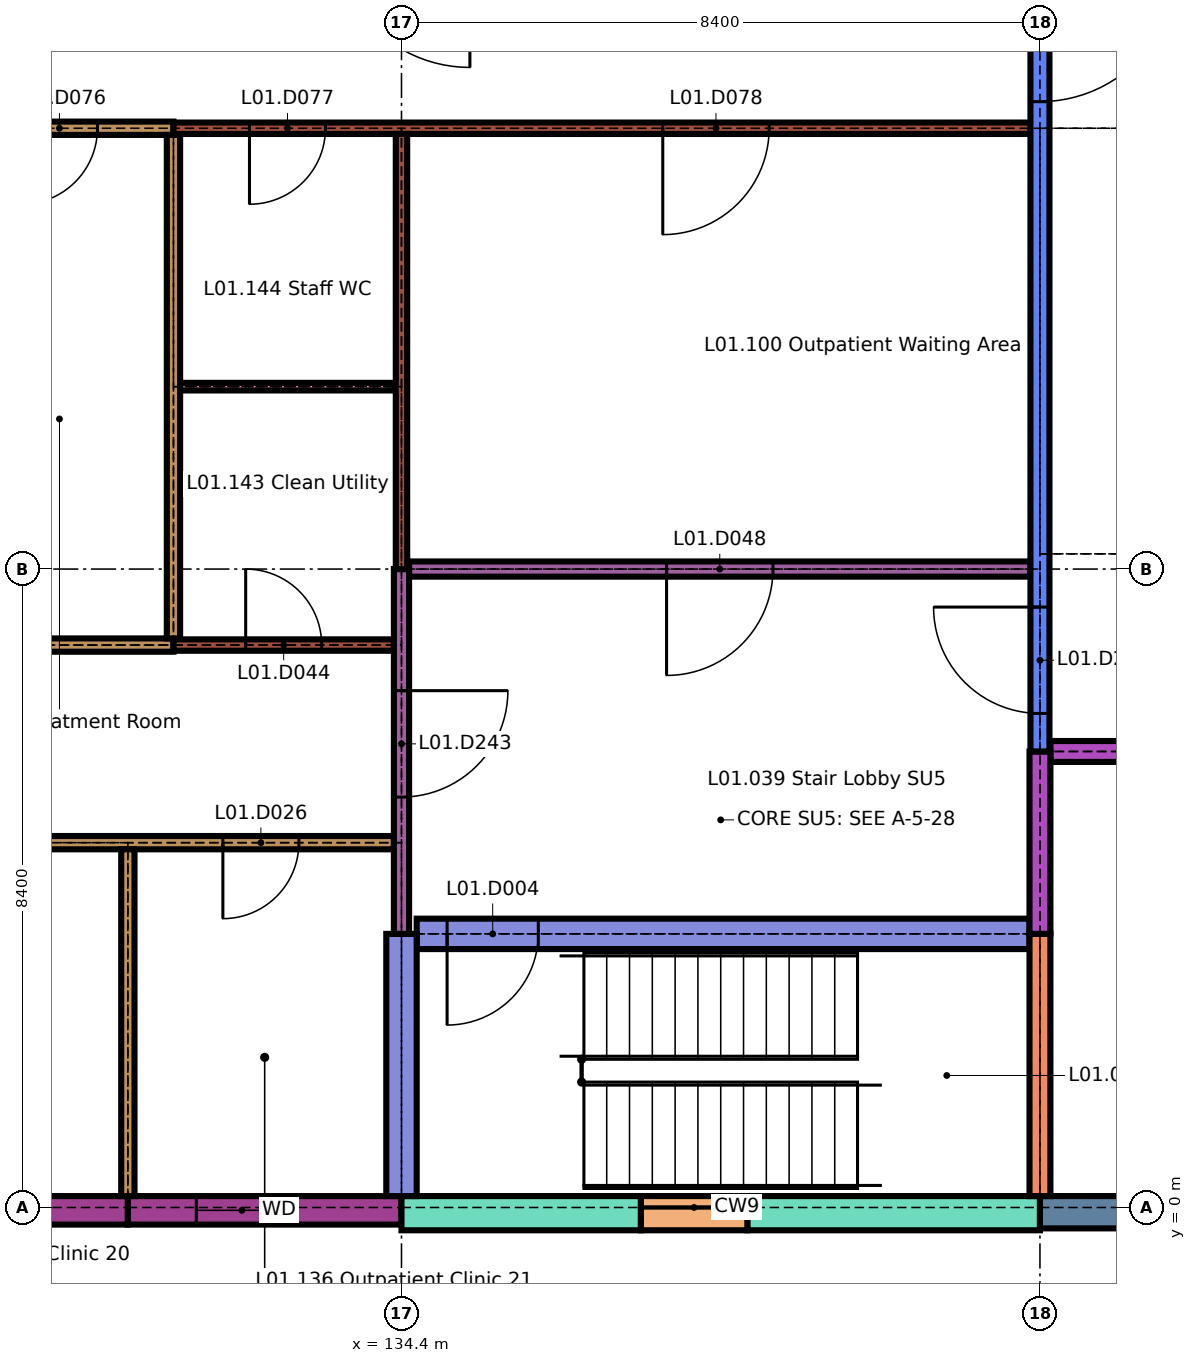
"""IFC4 building model, lengths in metres.
Left out: names, types, materials, properties, quantities, classifications, styles, units other than length and angle.
Written with IfcOpenShell. Run it as: python <this file> out.ifc"""

import sys

from ifc_helpers import new_model, si_unit, direction, frame, frame_2d, origin, place, context, subcontext, project, spatial, rectangle, extrude, element, fill, save


model = new_model("IFC4")
c1 = context("Model", 3, precision=1e-05, world=origin(), true_north=direction((0.0, 1.0)))
c2 = subcontext(c1, "Body", "Model", "MODEL_VIEW")
j1 = project(units=[si_unit("LENGTHUNIT", "METRE"), si_unit("PLANEANGLEUNIT", "RADIAN")], contexts=[c1])
p1 = place(None, origin())
s1 = spatial("IfcSite", under=j1, at=p1, CompositionType="ELEMENT")
p2 = place(p1, origin())
s2 = spatial("IfcBuilding", under=s1, at=p2, CompositionType="ELEMENT")
p3 = place(p2, frame((0.0, 0.0, 4.5)))
s3 = spatial("IfcBuildingStorey", under=s2, at=p3, CompositionType="ELEMENT", Elevation=4.5)
p4 = place(p3, frame((126.45, -0.038, 0.0), z_axis=(0.0, 0.0, 1.0), x_axis=(1.0, 0.0, 0.0)))
e1 = element("IfcWall", 1, at=p4, inside=s3, PredefinedType="SOLIDWALL", context=c2, shape_type="SweptSolid", body=[
    extrude(rectangle(XDim=4.35, YDim=0.375, at=frame_2d((2.175, 0.0))), origin(), (0.0, 0.0, 1.0), 3.15),
])
p5 = place(p4, frame((1.2, 0.0, 0.9)))
e2 = element("IfcOpeningElement", 2, at=p5, cuts=e1, PredefinedType="OPENING", context=c2, shape_type="SweptSolid", body=[
    extrude(rectangle(XDim=0.9, YDim=1.5, at=frame_2d((0.45, 0.75))), frame((0.0, 0.198, 0.0), z_axis=(0.0, -1.0, 0.0), x_axis=(1.0, 0.0, 0.0)), (0.0, 0.0, 1.0), 0.395),
])
p6 = place(p3, frame((130.8, -0.038, 0.0), z_axis=(0.0, 0.0, 1.0), x_axis=(1.0, 0.0, 0.0)))
e3 = element("IfcWall", 3, at=p6, inside=s3, PredefinedType="SOLIDWALL", context=c2, shape_type="SweptSolid", body=[
    extrude(rectangle(XDim=3.6, YDim=0.375, at=frame_2d((1.8, 0.0))), origin(), (0.0, 0.0, 1.0), 3.15),
])
p7 = place(p6, frame((0.9, 0.0, 0.9)))
e4 = element("IfcOpeningElement", 4, at=p7, cuts=e3, PredefinedType="OPENING", context=c2, shape_type="SweptSolid", body=[
    extrude(rectangle(XDim=1.2, YDim=1.5, at=frame_2d((0.6, 0.75))), frame((0.0, 0.198, 0.0), z_axis=(0.0, -1.0, 0.0), x_axis=(1.0, 0.0, 0.0)), (0.0, 0.0, 1.0), 0.395),
])
p8 = place(p3, frame((134.4, -0.075, 0.0), z_axis=(0.0, 0.0, 1.0), x_axis=(1.0, 0.0, 0.0)))
e5 = element("IfcWall", 5, at=p8, inside=s3, PredefinedType="SOLIDWALL", context=c2, shape_type="SweptSolid", body=[
    extrude(rectangle(XDim=3.15, YDim=0.45, at=frame_2d((1.575, 0.0))), origin(), (0.0, 0.0, 1.0), 3.45),
])
p9 = place(p3, frame((138.95, -0.075, 0.0), z_axis=(0.0, 0.0, 1.0), x_axis=(1.0, 0.0, 0.0)))
e6 = element("IfcWall", 6, at=p9, inside=s3, PredefinedType="SOLIDWALL", context=c2, shape_type="SweptSolid", body=[
    extrude(rectangle(XDim=3.85, YDim=0.45, at=frame_2d((1.925, 0.0))), origin(), (0.0, 0.0, 1.0), 3.45),
])
p10 = place(p3, frame((137.55, -0.075, 0.0), z_axis=(0.0, 0.0, 1.0), x_axis=(1.0, 0.0, 0.0)))
e7 = element("IfcWall", 7, at=p10, inside=s3, PredefinedType="SOLIDWALL", context=c2, shape_type="SweptSolid", body=[
    extrude(rectangle(XDim=1.4, YDim=0.45, at=frame_2d((0.7, 0.0))), origin(), (0.0, 0.0, 1.0), 0.6),
])
p11 = place(p3, frame((142.8, -0.062, 0.0), z_axis=(0.0, 0.0, 1.0), x_axis=(1.0, 0.0, 0.0)))
e8 = element("IfcWall", 8, at=p11, inside=s3, PredefinedType="SOLIDWALL", context=c2, shape_type="SweptSolid", body=[
    extrude(rectangle(XDim=7.975, YDim=0.425, at=frame_2d((3.987, 0.0))), origin(), (0.0, 0.0, 1.0), 3.15),
])
p12 = place(p3, frame((134.6, 3.6, 0.0), z_axis=(0.0, 0.0, 1.0), x_axis=(1.0, 0.0, 0.0)))
e9 = element("IfcWall", 9, at=p12, inside=s3, PredefinedType="SHEAR", context=c2, shape_type="SweptSolid", body=[
    extrude(rectangle(XDim=8.062, YDim=0.4, at=frame_2d((4.031, 0.0))), origin(), (0.0, 0.0, 1.0), 3.45),
])
p13 = place(p12, frame((0.4, 0.0, 0.0)))
e10 = element("IfcOpeningElement", 10, at=p13, cuts=e9, PredefinedType="OPENING", context=c2, shape_type="SweptSolid", body=[
    extrude(rectangle(XDim=1.2, YDim=2.1, at=frame_2d((0.6, 1.05))), frame((0.0, 0.21, 0.0), z_axis=(0.0, -1.0, 0.0), x_axis=(1.0, 0.0, 0.0)), (0.0, 0.0, 1.0), 0.42),
])
p14 = place(p3, frame((109.3, 4.8, 0.0), z_axis=(0.0, 0.0, 1.0), x_axis=(1.0, 0.0, 0.0)))
e11 = element("IfcWall", 11, at=p14, inside=s3, PredefinedType="PARTITIONING", context=c2, shape_type="SweptSolid", body=[
    extrude(rectangle(XDim=25.0, YDim=0.175, at=frame_2d((12.5, 0.0))), origin(), (0.0, 0.0, 1.0), 3.45),
])
p15 = place(p14, frame((1.25, 0.0, 0.0)))
e12 = element("IfcOpeningElement", 12, at=p15, cuts=e11, PredefinedType="OPENING", context=c2, shape_type="SweptSolid", body=[
    extrude(rectangle(XDim=1.0, YDim=2.1, at=frame_2d((0.5, 1.05))), frame((0.0, 0.097, 0.0), z_axis=(0.0, -1.0, 0.0), x_axis=(1.0, 0.0, 0.0)), (0.0, 0.0, 1.0), 0.195),
])
p16 = place(p14, frame((4.8, 0.0, 0.0)))
e13 = element("IfcOpeningElement", 13, at=p16, cuts=e11, PredefinedType="OPENING", context=c2, shape_type="SweptSolid", body=[
    extrude(rectangle(XDim=1.0, YDim=2.1, at=frame_2d((0.5, 1.05))), frame((0.0, 0.097, 0.0), z_axis=(0.0, -1.0, 0.0), x_axis=(1.0, 0.0, 0.0)), (0.0, 0.0, 1.0), 0.195),
])
p17 = place(p14, frame((8.4, 0.0, 0.0)))
e14 = element("IfcOpeningElement", 14, at=p17, cuts=e11, PredefinedType="OPENING", context=c2, shape_type="SweptSolid", body=[
    extrude(rectangle(XDim=1.0, YDim=2.1, at=frame_2d((0.5, 1.05))), frame((0.0, 0.097, 0.0), z_axis=(0.0, -1.0, 0.0), x_axis=(1.0, 0.0, 0.0)), (0.0, 0.0, 1.0), 0.195),
])
p18 = place(p14, frame((12.0, 0.0, 0.0)))
e15 = element("IfcOpeningElement", 15, at=p18, cuts=e11, PredefinedType="OPENING", context=c2, shape_type="SweptSolid", body=[
    extrude(rectangle(XDim=1.0, YDim=2.1, at=frame_2d((0.5, 1.05))), frame((0.0, 0.097, 0.0), z_axis=(0.0, -1.0, 0.0), x_axis=(1.0, 0.0, 0.0)), (0.0, 0.0, 1.0), 0.195),
])
p19 = place(p14, frame((15.6, 0.0, 0.0)))
e16 = element("IfcOpeningElement", 16, at=p19, cuts=e11, PredefinedType="OPENING", context=c2, shape_type="SweptSolid", body=[
    extrude(rectangle(XDim=1.0, YDim=2.1, at=frame_2d((0.5, 1.05))), frame((0.0, 0.097, 0.0), z_axis=(0.0, -1.0, 0.0), x_axis=(1.0, 0.0, 0.0)), (0.0, 0.0, 1.0), 0.195),
])
p20 = place(p14, frame((19.2, 0.0, 0.0)))
e17 = element("IfcOpeningElement", 17, at=p20, cuts=e11, PredefinedType="OPENING", context=c2, shape_type="SweptSolid", body=[
    extrude(rectangle(XDim=1.0, YDim=2.1, at=frame_2d((0.5, 1.05))), frame((0.0, 0.097, 0.0), z_axis=(0.0, -1.0, 0.0), x_axis=(1.0, 0.0, 0.0)), (0.0, 0.0, 1.0), 0.195),
])
p21 = place(p14, frame((22.75, 0.0, 0.0)))
e18 = element("IfcOpeningElement", 18, at=p21, cuts=e11, PredefinedType="OPENING", context=c2, shape_type="SweptSolid", body=[
    extrude(rectangle(XDim=1.0, YDim=2.1, at=frame_2d((0.5, 1.05))), frame((0.0, 0.097, 0.0), z_axis=(0.0, -1.0, 0.0), x_axis=(1.0, 0.0, 0.0)), (0.0, 0.0, 1.0), 0.195),
])
p22 = place(p3, frame((142.938, 6.0, 0.0), z_axis=(0.0, 0.0, 1.0), x_axis=(1.0, 0.0, 0.0)))
e19 = element("IfcWall", 19, at=p22, inside=s3, PredefinedType="SOLIDWALL", context=c2, shape_type="SweptSolid", body=[
    extrude(rectangle(XDim=7.363, YDim=0.275, at=frame_2d((3.681, 0.0))), origin(), (0.0, 0.0, 1.0), 3.45),
])
p23 = place(p22, frame((2.931, 0.0, 0.0)))
e20 = element("IfcOpeningElement", 20, at=p23, cuts=e19, PredefinedType="OPENING", context=c2, shape_type="SweptSolid", body=[
    extrude(rectangle(XDim=1.5, YDim=2.4, at=frame_2d((0.75, 1.2))), frame((0.0, 0.147, 0.0), z_axis=(0.0, -1.0, 0.0), x_axis=(1.0, 0.0, 0.0)), (0.0, 0.0, 1.0), 0.295),
])
p24 = place(p3, frame((128.4, 7.4, 0.0), z_axis=(0.0, 0.0, 1.0), x_axis=(1.0, 0.0, 0.0)))
e21 = element("IfcWall", 21, at=p24, inside=s3, PredefinedType="PARTITIONING", context=c2, shape_type="SweptSolid", body=[
    extrude(rectangle(XDim=3.0, YDim=0.175, at=frame_2d((1.5, 0.0))), origin(), (0.0, 0.0, 1.0), 3.45),
])
p25 = place(p3, frame((131.4, 7.4, 0.0), z_axis=(0.0, 0.0, 1.0), x_axis=(1.0, 0.0, 0.0)))
e22 = element("IfcWall", 22, at=p25, inside=s3, PredefinedType="PARTITIONING", context=c2, shape_type="SweptSolid", body=[
    extrude(rectangle(XDim=2.9, YDim=0.15, at=frame_2d((1.45, 0.0))), origin(), (0.0, 0.0, 1.0), 3.45),
])
p26 = place(p25, frame((0.95, 0.0, 0.0)))
e23 = element("IfcOpeningElement", 23, at=p26, cuts=e22, PredefinedType="OPENING", context=c2, shape_type="SweptSolid", body=[
    extrude(rectangle(XDim=1.0, YDim=2.1, at=frame_2d((0.5, 1.05))), frame((0.0, 0.085, 0.0), z_axis=(0.0, -1.0, 0.0), x_axis=(1.0, 0.0, 0.0)), (0.0, 0.0, 1.0), 0.17),
])
p27 = place(p3, frame((134.5, 8.4, 0.0), z_axis=(0.0, 0.0, 1.0), x_axis=(1.0, 0.0, 0.0)))
e24 = element("IfcWall", 24, at=p27, inside=s3, PredefinedType="PARTITIONING", context=c2, shape_type="SweptSolid", body=[
    extrude(rectangle(XDim=8.175, YDim=0.2, at=frame_2d((4.087, 0.0))), origin(), (0.0, 0.0, 1.0), 3.45),
])
p28 = place(p27, frame((3.387, 0.0, 0.0)))
e25 = element("IfcOpeningElement", 25, at=p28, cuts=e24, PredefinedType="OPENING", context=c2, shape_type="SweptSolid", body=[
    extrude(rectangle(XDim=1.4, YDim=2.1, at=frame_2d((0.7, 1.05))), frame((0.0, 0.11, 0.0), z_axis=(0.0, -1.0, 0.0), x_axis=(1.0, 0.0, 0.0)), (0.0, 0.0, 1.0), 0.22),
])
p29 = place(p3, frame((131.488, 10.8, 0.0), z_axis=(0.0, 0.0, 1.0), x_axis=(1.0, 0.0, 0.0)))
e26 = element("IfcWall", 26, at=p29, inside=s3, PredefinedType="PARTITIONING", context=c2, shape_type="SweptSolid", body=[
    extrude(rectangle(XDim=2.837, YDim=0.1, at=frame_2d((1.419, 0.0))), origin(), (0.0, 0.0, 1.0), 3.45),
])
p30 = place(p3, frame((128.4, 14.2, 0.0), z_axis=(0.0, 0.0, 1.0), x_axis=(1.0, 0.0, 0.0)))
e27 = element("IfcWall", 27, at=p30, inside=s3, PredefinedType="PARTITIONING", context=c2, shape_type="SweptSolid", body=[
    extrude(rectangle(XDim=3.0, YDim=0.175, at=frame_2d((1.5, 0.0))), origin(), (0.0, 0.0, 1.0), 3.45),
])
p31 = place(p30, frame((1.0, 0.0, 0.0)))
e28 = element("IfcOpeningElement", 28, at=p31, cuts=e27, PredefinedType="OPENING", context=c2, shape_type="SweptSolid", body=[
    extrude(rectangle(XDim=1.0, YDim=2.1, at=frame_2d((0.5, 1.05))), frame((0.0, 0.097, 0.0), z_axis=(0.0, -1.0, 0.0), x_axis=(1.0, 0.0, 0.0)), (0.0, 0.0, 1.0), 0.195),
])
p32 = place(p3, frame((131.4, 14.2, 0.0), z_axis=(0.0, 0.0, 1.0), x_axis=(1.0, 0.0, 0.0)))
e29 = element("IfcWall", 29, at=p32, inside=s3, PredefinedType="PARTITIONING", context=c2, shape_type="SweptSolid", body=[
    extrude(rectangle(XDim=11.275, YDim=0.15, at=frame_2d((5.638, 0.0))), origin(), (0.0, 0.0, 1.0), 3.45),
])
p33 = place(p32, frame((1.0, 0.0, 0.0)))
e30 = element("IfcOpeningElement", 30, at=p33, cuts=e29, PredefinedType="OPENING", context=c2, shape_type="SweptSolid", body=[
    extrude(rectangle(XDim=1.0, YDim=2.1, at=frame_2d((0.5, 1.05))), frame((0.0, 0.085, 0.0), z_axis=(0.0, -1.0, 0.0), x_axis=(1.0, 0.0, 0.0)), (0.0, 0.0, 1.0), 0.17),
])
p34 = place(p32, frame((6.438, 0.0, 0.0)))
e31 = element("IfcOpeningElement", 31, at=p34, cuts=e29, PredefinedType="OPENING", context=c2, shape_type="SweptSolid", body=[
    extrude(rectangle(XDim=1.4, YDim=2.1, at=frame_2d((0.7, 1.05))), frame((0.0, 0.085, 0.0), z_axis=(0.0, -1.0, 0.0), x_axis=(1.0, 0.0, 0.0)), (0.0, 0.0, 1.0), 0.17),
])
p35 = place(p3, frame((130.8, 0.15, 0.0), z_axis=(0.0, 0.0, 1.0), x_axis=(0.0, 1.0, 0.0)))
e32 = element("IfcWall", 32, at=p35, inside=s3, PredefinedType="PARTITIONING", context=c2, shape_type="SweptSolid", body=[
    extrude(rectangle(XDim=4.562, YDim=0.175, at=frame_2d((2.281, 0.0))), origin(), (0.0, 0.0, 1.0), 3.45),
])
p36 = place(p3, frame((131.4, 7.488, 0.0), z_axis=(0.0, 0.0, 1.0), x_axis=(0.0, 1.0, 0.0)))
e33 = element("IfcWall", 33, at=p36, inside=s3, PredefinedType="PARTITIONING", context=c2, shape_type="SweptSolid", body=[
    extrude(rectangle(XDim=6.625, YDim=0.175, at=frame_2d((3.312, 0.0))), origin(), (0.0, 0.0, 1.0), 3.45),
])
p37 = place(p3, frame((134.4, 0.15, 0.0), z_axis=(0.0, 0.0, 1.0), x_axis=(0.0, 1.0, 0.0)))
e34 = element("IfcWall", 34, at=p37, inside=s3, PredefinedType="SHEAR", context=c2, shape_type="SweptSolid", body=[
    extrude(rectangle(XDim=3.45, YDim=0.4, at=frame_2d((1.725, 0.0))), origin(), (0.0, 0.0, 1.0), 3.45),
])
p38 = place(p3, frame((134.4, 3.6, 0.0), z_axis=(0.0, 0.0, 1.0), x_axis=(0.0, 1.0, 0.0)))
e35 = element("IfcWall", 35, at=p38, inside=s3, PredefinedType="PARTITIONING", context=c2, shape_type="SweptSolid", body=[
    extrude(rectangle(XDim=4.8, YDim=0.2, at=frame_2d((2.4, 0.0))), origin(), (0.0, 0.0, 1.0), 3.45),
])
p39 = place(p38, frame((1.8, 0.0, 0.0)))
e36 = element("IfcOpeningElement", 36, at=p39, cuts=e35, PredefinedType="OPENING", context=c2, shape_type="SweptSolid", body=[
    extrude(rectangle(XDim=1.4, YDim=2.1, at=frame_2d((0.7, 1.05))), frame((0.0, 0.11, 0.0), z_axis=(0.0, -1.0, 0.0), x_axis=(1.0, 0.0, 0.0)), (0.0, 0.0, 1.0), 0.22),
])
p40 = place(p3, frame((134.4, 8.4, 0.0), z_axis=(0.0, 0.0, 1.0), x_axis=(0.0, 1.0, 0.0)))
e37 = element("IfcWall", 37, at=p40, inside=s3, PredefinedType="PARTITIONING", context=c2, shape_type="SweptSolid", body=[
    extrude(rectangle(XDim=5.725, YDim=0.15, at=frame_2d((2.863, 0.0))), origin(), (0.0, 0.0, 1.0), 3.45),
])
p41 = place(p3, frame((142.8, 0.15, 0.0), z_axis=(0.0, 0.0, 1.0), x_axis=(0.0, 1.0, 0.0)))
e38 = element("IfcWall", 38, at=p41, inside=s3, PredefinedType="SOLIDWALL", context=c2, shape_type="SweptSolid", body=[
    extrude(rectangle(XDim=3.45, YDim=0.275, at=frame_2d((1.725, 0.0))), origin(), (0.0, 0.0, 1.0), 3.45),
])
p42 = place(p3, frame((142.8, 3.6, 0.0), z_axis=(0.0, 0.0, 1.0), x_axis=(0.0, 1.0, 0.0)))
e39 = element("IfcWall", 39, at=p42, inside=s3, PredefinedType="SOLIDWALL", context=c2, shape_type="SweptSolid", body=[
    extrude(rectangle(XDim=2.4, YDim=0.275, at=frame_2d((1.2, 0.0))), origin(), (0.0, 0.0, 1.0), 3.45),
])
p43 = place(p3, frame((142.8, 6.0, 0.0), z_axis=(0.0, 0.0, 1.0), x_axis=(0.0, 1.0, 0.0)))
e40 = element("IfcWall", 40, at=p43, inside=s3, PredefinedType="SOLIDWALL", context=c2, shape_type="SweptSolid", body=[
    extrude(rectangle(XDim=10.7, YDim=0.25, at=frame_2d((5.35, 0.0))), origin(), (0.0, 0.0, 1.0), 3.45),
])
p44 = place(p43, frame((0.5, 0.0, 0.0)))
e41 = element("IfcOpeningElement", 41, at=p44, cuts=e40, PredefinedType="OPENING", context=c2, shape_type="SweptSolid", body=[
    extrude(rectangle(XDim=1.4, YDim=2.1, at=frame_2d((0.7, 1.05))), frame((0.0, 0.135, 0.0), z_axis=(0.0, -1.0, 0.0), x_axis=(1.0, 0.0, 0.0)), (0.0, 0.0, 1.0), 0.27),
])
p45 = place(p43, frame((8.55, 0.0, 0.0)))
e42 = element("IfcOpeningElement", 42, at=p45, cuts=e40, PredefinedType="OPENING", context=c2, shape_type="SweptSolid", body=[
    extrude(rectangle(XDim=1.8, YDim=2.4, at=frame_2d((0.9, 1.2))), frame((0.0, 0.135, 0.0), z_axis=(0.0, -1.0, 0.0), x_axis=(1.0, 0.0, 0.0)), (0.0, 0.0, 1.0), 0.27),
])
p46 = place(p7, origin())
e43 = element("IfcWindow", 43, at=p46, inside=s3, PartitioningType="SINGLE_PANEL", PredefinedType="WINDOW", context=c2, shape_type="SweptSolid", body=[
    extrude(rectangle(XDim=1.2, YDim=1.5, at=frame_2d((0.6, 0.75))), frame((0.0, 0.03, 0.0), z_axis=(0.0, -1.0, 0.0), x_axis=(1.0, 0.0, 0.0)), (0.0, 0.0, 1.0), 0.06),
])
fill(e4, e43)
p47 = place(p13, origin())
e44 = element("IfcDoor", 44, at=p47, inside=s3, OperationType="SINGLE_SWING_LEFT", PredefinedType="DOOR", context=c2, shape_type="SweptSolid", body=[
    extrude(rectangle(XDim=1.2, YDim=2.1, at=frame_2d((0.6, 1.05))), frame((0.0, 0.025, 0.0), z_axis=(0.0, -1.0, 0.0), x_axis=(1.0, 0.0, 0.0)), (0.0, 0.0, 1.0), 0.05),
])
fill(e10, e44)
p48 = place(p21, origin())
e45 = element("IfcDoor", 45, at=p48, inside=s3, OperationType="SINGLE_SWING_LEFT", PredefinedType="DOOR", context=c2, shape_type="SweptSolid", body=[
    extrude(rectangle(XDim=1.0, YDim=2.1, at=frame_2d((0.5, 1.05))), frame((0.0, 0.035, 0.0), z_axis=(0.0, -1.0, 0.0), x_axis=(1.0, 0.0, 0.0)), (0.0, 0.0, 1.0), 0.07),
])
fill(e18, e45)
p49 = place(p26, origin())
e46 = element("IfcDoor", 46, at=p49, inside=s3, OperationType="SINGLE_SWING_RIGHT", PredefinedType="DOOR", context=c2, shape_type="SweptSolid", body=[
    extrude(rectangle(XDim=1.0, YDim=2.1, at=frame_2d((0.5, 1.05))), frame((0.0, 0.025, 0.0), z_axis=(0.0, -1.0, 0.0), x_axis=(1.0, 0.0, 0.0)), (0.0, 0.0, 1.0), 0.05),
])
fill(e23, e46)
p50 = place(p28, origin())
e47 = element("IfcDoor", 47, at=p50, inside=s3, OperationType="SINGLE_SWING_LEFT", PredefinedType="DOOR", context=c2, shape_type="SweptSolid", body=[
    extrude(rectangle(XDim=1.4, YDim=2.1, at=frame_2d((0.7, 1.05))), frame((0.0, 0.025, 0.0), z_axis=(0.0, -1.0, 0.0), x_axis=(1.0, 0.0, 0.0)), (0.0, 0.0, 1.0), 0.05),
])
fill(e25, e47)
p51 = place(p31, origin())
e48 = element("IfcDoor", 48, at=p51, inside=s3, OperationType="SINGLE_SWING_LEFT", PredefinedType="DOOR", context=c2, shape_type="SweptSolid", body=[
    extrude(rectangle(XDim=1.0, YDim=2.1, at=frame_2d((0.5, 1.05))), frame((0.0, 0.035, 0.0), z_axis=(0.0, -1.0, 0.0), x_axis=(1.0, 0.0, 0.0)), (0.0, 0.0, 1.0), 0.07),
])
fill(e28, e48)
p52 = place(p33, origin())
e49 = element("IfcDoor", 49, at=p52, inside=s3, OperationType="SINGLE_SWING_LEFT", PredefinedType="DOOR", context=c2, shape_type="SweptSolid", body=[
    extrude(rectangle(XDim=1.0, YDim=2.1, at=frame_2d((0.5, 1.05))), frame((0.0, 0.025, 0.0), z_axis=(0.0, -1.0, 0.0), x_axis=(1.0, 0.0, 0.0)), (0.0, 0.0, 1.0), 0.05),
])
fill(e30, e49)
p53 = place(p34, origin())
e50 = element("IfcDoor", 50, at=p53, inside=s3, OperationType="SINGLE_SWING_LEFT", PredefinedType="DOOR", context=c2, shape_type="SweptSolid", body=[
    extrude(rectangle(XDim=1.4, YDim=2.1, at=frame_2d((0.7, 1.05))), frame((0.0, 0.025, 0.0), z_axis=(0.0, -1.0, 0.0), x_axis=(1.0, 0.0, 0.0)), (0.0, 0.0, 1.0), 0.05),
])
fill(e31, e50)
p54 = place(p39, origin())
e51 = element("IfcDoor", 51, at=p54, inside=s3, OperationType="SINGLE_SWING_RIGHT", PredefinedType="DOOR", context=c2, shape_type="SweptSolid", body=[
    extrude(rectangle(XDim=1.4, YDim=2.1, at=frame_2d((0.7, 1.05))), frame((0.0, 0.03, 0.0), z_axis=(0.0, -1.0, 0.0), x_axis=(1.0, 0.0, 0.0)), (0.0, 0.0, 1.0), 0.06),
])
fill(e36, e51)
p55 = place(p44, origin())
e52 = element("IfcDoor", 52, at=p55, inside=s3, OperationType="SINGLE_SWING_LEFT", PredefinedType="DOOR", context=c2, shape_type="SweptSolid", body=[
    extrude(rectangle(XDim=1.4, YDim=2.1, at=frame_2d((0.7, 1.05))), frame((0.0, 0.03, 0.0), z_axis=(0.0, -1.0, 0.0), x_axis=(1.0, 0.0, 0.0)), (0.0, 0.0, 1.0), 0.06),
])
fill(e41, e52)
p56 = place(p45, origin())
e53 = element("IfcDoor", 53, at=p56, inside=s3, OperationType="SINGLE_SWING_RIGHT", PredefinedType="DOOR", context=c2, shape_type="SweptSolid", body=[
    extrude(rectangle(XDim=1.8, YDim=2.4, at=frame_2d((0.9, 1.2))), frame((0.0, 0.03, 0.0), z_axis=(0.0, -1.0, 0.0), x_axis=(1.0, 0.0, 0.0)), (0.0, 0.0, 1.0), 0.06),
])
fill(e42, e53)
save(model, sys.argv[1])
